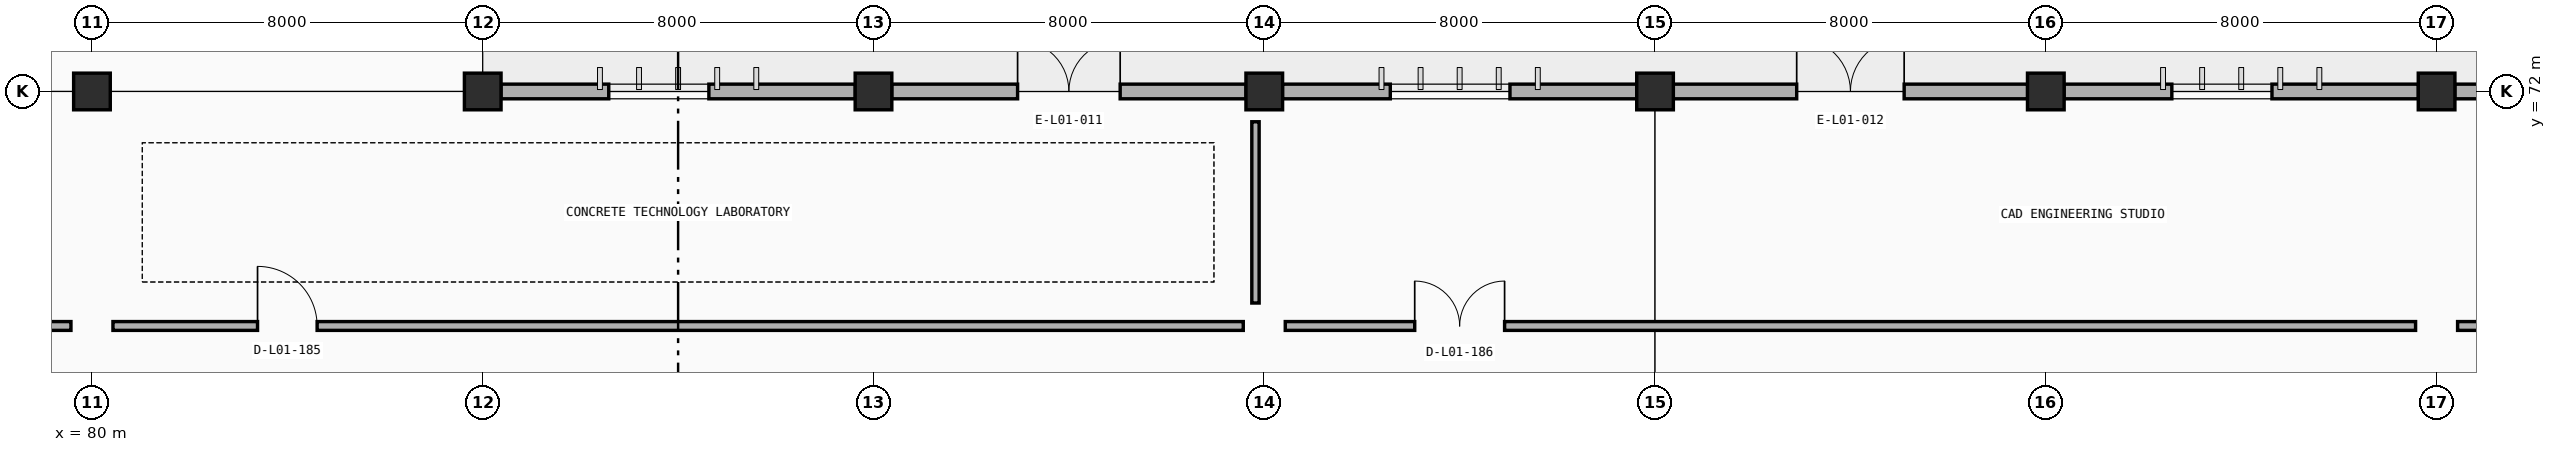
"""IFC4 building model, lengths in metres.
Left out: names, types, materials, properties, quantities, classifications, styles, units other than length and angle.
Written with IfcOpenShell. Run it as: python <this file> out.ifc"""

import sys

from ifc_helpers import new_model, si_unit, direction, frame, frame_2d, origin, origin_2d, place, context, subcontext, project, spatial, rectangle, extrude, element, fill, save


model = new_model("IFC4")
c1 = context("Model", 3, precision=1e-05, world=origin(), true_north=direction((0.0, 1.0)))
c2 = subcontext(c1, "Body", "Model", "MODEL_VIEW")
j1 = project(units=[si_unit("LENGTHUNIT", "METRE"), si_unit("PLANEANGLEUNIT", "RADIAN")], contexts=[c1])
p1 = place(None, origin())
s1 = spatial("IfcSite", under=j1, at=p1, CompositionType="ELEMENT")
p2 = place(p1, origin())
s2 = spatial("IfcBuilding", under=s1, at=p2, CompositionType="ELEMENT")
p3 = place(p2, origin())
s3 = spatial("IfcBuildingStorey", under=s2, at=p3, CompositionType="ELEMENT", Elevation=0.0)
for number, where, z_axis, x_axis in (
    (1, (80.0, 72.0, 0.0), (0.0, 0.0, 1.0), (1.0, 0.0, 0.0)),
    (2, (88.0, 72.0, 0.0), (0.0, 0.0, 1.0), (1.0, 0.0, 0.0)),
    (3, (96.0, 72.0, 0.0), (0.0, 0.0, 1.0), (1.0, 0.0, 0.0)),
    (4, (104.0, 72.0, 0.0), (0.0, 0.0, 1.0), (1.0, 0.0, 0.0)),
    (5, (112.0, 72.0, 0.0), (0.0, 0.0, 1.0), (1.0, 0.0, 0.0)),
    (6, (120.0, 72.0, 0.0), (0.0, 0.0, 1.0), (1.0, 0.0, 0.0)),
    (7, (128.0, 72.0, 0.0), (0.0, 0.0, 1.0), (1.0, 0.0, 0.0)),
):
    element("IfcColumn", number, at=place(p3, frame(where, z_axis=z_axis, x_axis=x_axis)), inside=s3, PredefinedType="COLUMN", context=c2, shape_type="SweptSolid", body=[
        extrude(rectangle(XDim=0.75, YDim=0.75, at=origin_2d()), origin(), (0.0, 0.0, 1.0), 4.8),
    ])
p4 = place(p3, frame((88.372, 72.0, 0.0), z_axis=(0.0, 0.0, 1.0), x_axis=(1.0, 0.0, 0.0)))
e8 = element("IfcWall", 8, at=p4, inside=s3, PredefinedType="STANDARD", context=c2, shape_type="SweptSolid", body=[
    extrude(rectangle(XDim=7.256, YDim=0.3, at=frame_2d((3.628, 0.0))), origin(), (0.0, 0.0, 1.0), 3.91),
])
p5 = place(p4, frame((2.208, 0.0, 0.9)))
e9 = element("IfcOpeningElement", 9, at=p5, cuts=e8, PredefinedType="OPENING", context=c2, shape_type="SweptSolid", body=[
    extrude(rectangle(XDim=2.05, YDim=1.85, at=frame_2d((1.025, 0.925))), frame((0.0, 0.16, 0.0), z_axis=(0.0, -1.0, 0.0), x_axis=(1.0, 0.0, 0.0)), (0.0, 0.0, 1.0), 0.32),
])
p6 = place(p3, frame((96.372, 72.0, 0.0), z_axis=(0.0, 0.0, 1.0), x_axis=(1.0, 0.0, 0.0)))
e10 = element("IfcWall", 10, at=p6, inside=s3, PredefinedType="STANDARD", context=c2, shape_type="SweptSolid", body=[
    extrude(rectangle(XDim=7.256, YDim=0.3, at=frame_2d((3.628, 0.0))), origin(), (0.0, 0.0, 1.0), 3.91),
])
p7 = place(p6, frame((2.578, 0.0, 0.0)))
e11 = element("IfcOpeningElement", 11, at=p7, cuts=e10, PredefinedType="OPENING", context=c2, shape_type="SweptSolid", body=[
    extrude(rectangle(XDim=2.1, YDim=2.4, at=frame_2d((1.05, 1.2))), frame((0.0, 0.16, 0.0), z_axis=(0.0, -1.0, 0.0), x_axis=(1.0, 0.0, 0.0)), (0.0, 0.0, 1.0), 0.32),
])
p8 = place(p3, frame((104.372, 72.0, 0.0), z_axis=(0.0, 0.0, 1.0), x_axis=(1.0, 0.0, 0.0)))
e12 = element("IfcWall", 12, at=p8, inside=s3, PredefinedType="STANDARD", context=c2, shape_type="SweptSolid", body=[
    extrude(rectangle(XDim=7.256, YDim=0.3, at=frame_2d((3.628, 0.0))), origin(), (0.0, 0.0, 1.0), 3.91),
])
p9 = place(p8, frame((2.208, 0.0, 0.9)))
e13 = element("IfcOpeningElement", 13, at=p9, cuts=e12, PredefinedType="OPENING", context=c2, shape_type="SweptSolid", body=[
    extrude(rectangle(XDim=2.45, YDim=1.85, at=frame_2d((1.225, 0.925))), frame((0.0, 0.16, 0.0), z_axis=(0.0, -1.0, 0.0), x_axis=(1.0, 0.0, 0.0)), (0.0, 0.0, 1.0), 0.32),
])
p10 = place(p3, frame((112.372, 72.0, 0.0), z_axis=(0.0, 0.0, 1.0), x_axis=(1.0, 0.0, 0.0)))
e14 = element("IfcWall", 14, at=p10, inside=s3, PredefinedType="STANDARD", context=c2, shape_type="SweptSolid", body=[
    extrude(rectangle(XDim=7.256, YDim=0.3, at=frame_2d((3.628, 0.0))), origin(), (0.0, 0.0, 1.0), 3.91),
])
p11 = place(p10, frame((2.528, 0.0, 0.0)))
e15 = element("IfcOpeningElement", 15, at=p11, cuts=e14, PredefinedType="OPENING", context=c2, shape_type="SweptSolid", body=[
    extrude(rectangle(XDim=2.2, YDim=2.4, at=frame_2d((1.1, 1.2))), frame((0.0, 0.16, 0.0), z_axis=(0.0, -1.0, 0.0), x_axis=(1.0, 0.0, 0.0)), (0.0, 0.0, 1.0), 0.32),
])
p12 = place(p3, frame((120.372, 72.0, 0.0), z_axis=(0.0, 0.0, 1.0), x_axis=(1.0, 0.0, 0.0)))
e16 = element("IfcWall", 16, at=p12, inside=s3, PredefinedType="STANDARD", context=c2, shape_type="SweptSolid", body=[
    extrude(rectangle(XDim=7.256, YDim=0.3, at=frame_2d((3.628, 0.0))), origin(), (0.0, 0.0, 1.0), 3.91),
])
p13 = place(p12, frame((2.208, 0.0, 0.9)))
e17 = element("IfcOpeningElement", 17, at=p13, cuts=e16, PredefinedType="OPENING", context=c2, shape_type="SweptSolid", body=[
    extrude(rectangle(XDim=2.05, YDim=1.85, at=frame_2d((1.025, 0.925))), frame((0.0, 0.16, 0.0), z_axis=(0.0, -1.0, 0.0), x_axis=(1.0, 0.0, 0.0)), (0.0, 0.0, 1.0), 0.32),
])
p14 = place(p3, frame((128.372, 72.0, 0.0), z_axis=(0.0, 0.0, 1.0), x_axis=(1.0, 0.0, 0.0)))
e18 = element("IfcWall", 18, at=p14, inside=s3, PredefinedType="STANDARD", context=c2, shape_type="SweptSolid", body=[
    extrude(rectangle(XDim=7.256, YDim=0.3, at=frame_2d((3.628, 0.0))), origin(), (0.0, 0.0, 1.0), 3.91),
])
p15 = place(p14, frame((2.208, 0.0, 0.9)))
e19 = element("IfcOpeningElement", 19, at=p15, cuts=e18, PredefinedType="OPENING", context=c2, shape_type="SweptSolid", body=[
    extrude(rectangle(XDim=2.25, YDim=1.85, at=frame_2d((1.125, 0.925))), frame((0.0, 0.16, 0.0), z_axis=(0.0, -1.0, 0.0), x_axis=(1.0, 0.0, 0.0)), (0.0, 0.0, 1.0), 0.32),
])
p16 = place(p3, frame((56.43, 67.2, 0.0), z_axis=(0.0, 0.0, 1.0), x_axis=(1.0, 0.0, 0.0)))
e20 = element("IfcWall", 20, at=p16, inside=s3, PredefinedType="PARTITIONING", context=c2, shape_type="SweptSolid", body=[
    extrude(rectangle(XDim=23.14, YDim=0.18, at=frame_2d((11.57, 0.0))), origin(), (0.0, 0.0, 1.0), 3.9),
])
p17 = place(p16, frame((2.995, 0.0, 0.0)))
e21 = element("IfcOpeningElement", 21, at=p17, cuts=e20, PredefinedType="OPENING", context=c2, shape_type="SweptSolid", body=[
    extrude(rectangle(XDim=1.15, YDim=2.15, at=frame_2d((0.575, 1.075))), frame((0.0, 0.1, 0.0), z_axis=(0.0, -1.0, 0.0), x_axis=(1.0, 0.0, 0.0)), (0.0, 0.0, 1.0), 0.2),
])
p18 = place(p3, frame((80.43, 67.2, 0.0), z_axis=(0.0, 0.0, 1.0), x_axis=(1.0, 0.0, 0.0)))
e22 = element("IfcWall", 22, at=p18, inside=s3, PredefinedType="PARTITIONING", context=c2, shape_type="SweptSolid", body=[
    extrude(rectangle(XDim=23.14, YDim=0.18, at=frame_2d((11.57, 0.0))), origin(), (0.0, 0.0, 1.0), 3.9),
])
p19 = place(p18, frame((2.96, 0.0, 0.0)))
e23 = element("IfcOpeningElement", 23, at=p19, cuts=e22, PredefinedType="OPENING", context=c2, shape_type="SweptSolid", body=[
    extrude(rectangle(XDim=1.22, YDim=2.18, at=frame_2d((0.61, 1.09))), frame((0.0, 0.1, 0.0), z_axis=(0.0, -1.0, 0.0), x_axis=(1.0, 0.0, 0.0)), (0.0, 0.0, 1.0), 0.2),
])
p20 = place(p3, frame((103.82, 67.67, 0.0), z_axis=(0.0, 0.0, 1.0), x_axis=(0.0, 1.0, 0.0)))
e24 = element("IfcWall", 24, at=p20, inside=s3, PredefinedType="PARTITIONING", context=c2, shape_type="SweptSolid", body=[
    extrude(rectangle(XDim=3.71, YDim=0.15, at=frame_2d((1.855, 0.0))), origin(), (0.0, 0.0, 1.0), 3.76),
])
p21 = place(p3, frame((104.43, 67.2, 0.0), z_axis=(0.0, 0.0, 1.0), x_axis=(1.0, 0.0, 0.0)))
e25 = element("IfcWall", 25, at=p21, inside=s3, PredefinedType="PARTITIONING", context=c2, shape_type="SweptSolid", body=[
    extrude(rectangle(XDim=23.14, YDim=0.18, at=frame_2d((11.57, 0.0))), origin(), (0.0, 0.0, 1.0), 3.9),
])
p22 = place(p21, frame((2.65, 0.0, 0.0)))
e26 = element("IfcOpeningElement", 26, at=p22, cuts=e25, PredefinedType="OPENING", context=c2, shape_type="SweptSolid", body=[
    extrude(rectangle(XDim=1.84, YDim=2.25, at=frame_2d((0.92, 1.125))), frame((0.0, 0.1, 0.0), z_axis=(0.0, -1.0, 0.0), x_axis=(1.0, 0.0, 0.0)), (0.0, 0.0, 1.0), 0.2),
])
p23 = place(p3, frame((128.43, 67.2, 0.0), z_axis=(0.0, 0.0, 1.0), x_axis=(1.0, 0.0, 0.0)))
e27 = element("IfcWall", 27, at=p23, inside=s3, PredefinedType="PARTITIONING", context=c2, shape_type="SweptSolid", body=[
    extrude(rectangle(XDim=23.14, YDim=0.18, at=frame_2d((11.57, 0.0))), origin(), (0.0, 0.0, 1.0), 3.9),
])
p24 = place(p23, frame((2.61, 0.0, 0.0)))
e28 = element("IfcOpeningElement", 28, at=p24, cuts=e27, PredefinedType="OPENING", context=c2, shape_type="SweptSolid", body=[
    extrude(rectangle(XDim=1.92, YDim=2.3, at=frame_2d((0.96, 1.15))), frame((0.0, 0.1, 0.0), z_axis=(0.0, -1.0, 0.0), x_axis=(1.0, 0.0, 0.0)), (0.0, 0.0, 1.0), 0.2),
])
p25 = place(p5, origin())
e29 = element("IfcWindow", 29, at=p25, inside=s3, PartitioningType="DOUBLE_PANEL_VERTICAL", PredefinedType="WINDOW", context=c2, shape_type="SweptSolid", body=[
    extrude(rectangle(XDim=2.05, YDim=1.85, at=frame_2d((1.025, 0.925))), frame((0.0, 0.03, 0.0), z_axis=(0.0, -1.0, 0.0), x_axis=(1.0, 0.0, 0.0)), (0.0, 0.0, 1.0), 0.06),
])
fill(e9, e29)
p26 = place(p7, origin())
e30 = element("IfcDoor", 30, at=p26, inside=s3, OperationType="DOUBLE_DOOR_SINGLE_SWING", PredefinedType="DOOR", context=c2, shape_type="SweptSolid", body=[
    extrude(rectangle(XDim=2.1, YDim=2.4, at=frame_2d((1.05, 1.2))), frame((0.0, 0.025, 0.0), z_axis=(0.0, -1.0, 0.0), x_axis=(1.0, 0.0, 0.0)), (0.0, 0.0, 1.0), 0.05),
])
fill(e11, e30)
p27 = place(p9, origin())
e31 = element("IfcWindow", 31, at=p27, inside=s3, PartitioningType="DOUBLE_PANEL_VERTICAL", PredefinedType="WINDOW", context=c2, shape_type="SweptSolid", body=[
    extrude(rectangle(XDim=2.45, YDim=1.85, at=frame_2d((1.225, 0.925))), frame((0.0, 0.03, 0.0), z_axis=(0.0, -1.0, 0.0), x_axis=(1.0, 0.0, 0.0)), (0.0, 0.0, 1.0), 0.06),
])
fill(e13, e31)
p28 = place(p11, origin())
e32 = element("IfcDoor", 32, at=p28, inside=s3, OperationType="DOUBLE_DOOR_SINGLE_SWING", PredefinedType="DOOR", context=c2, shape_type="SweptSolid", body=[
    extrude(rectangle(XDim=2.2, YDim=2.4, at=frame_2d((1.1, 1.2))), frame((0.0, 0.025, 0.0), z_axis=(0.0, -1.0, 0.0), x_axis=(1.0, 0.0, 0.0)), (0.0, 0.0, 1.0), 0.05),
])
fill(e15, e32)
p29 = place(p13, origin())
e33 = element("IfcWindow", 33, at=p29, inside=s3, PartitioningType="DOUBLE_PANEL_VERTICAL", PredefinedType="WINDOW", context=c2, shape_type="SweptSolid", body=[
    extrude(rectangle(XDim=2.05, YDim=1.85, at=frame_2d((1.025, 0.925))), frame((0.0, 0.03, 0.0), z_axis=(0.0, -1.0, 0.0), x_axis=(1.0, 0.0, 0.0)), (0.0, 0.0, 1.0), 0.06),
])
fill(e17, e33)
p30 = place(p19, origin())
e34 = element("IfcDoor", 34, at=p30, inside=s3, OperationType="SINGLE_SWING_LEFT", PredefinedType="DOOR", context=c2, shape_type="SweptSolid", body=[
    extrude(rectangle(XDim=1.22, YDim=2.18, at=frame_2d((0.61, 1.09))), frame((0.0, 0.025, 0.0), z_axis=(0.0, -1.0, 0.0), x_axis=(1.0, 0.0, 0.0)), (0.0, 0.0, 1.0), 0.05),
])
fill(e23, e34)
p31 = place(p22, origin())
e35 = element("IfcDoor", 35, at=p31, inside=s3, OperationType="DOUBLE_DOOR_SINGLE_SWING", PredefinedType="DOOR", context=c2, shape_type="SweptSolid", body=[
    extrude(rectangle(XDim=1.84, YDim=2.25, at=frame_2d((0.92, 1.125))), frame((0.0, 0.025, 0.0), z_axis=(0.0, -1.0, 0.0), x_axis=(1.0, 0.0, 0.0)), (0.0, 0.0, 1.0), 0.05),
])
fill(e26, e35)
save(model, sys.argv[1])
